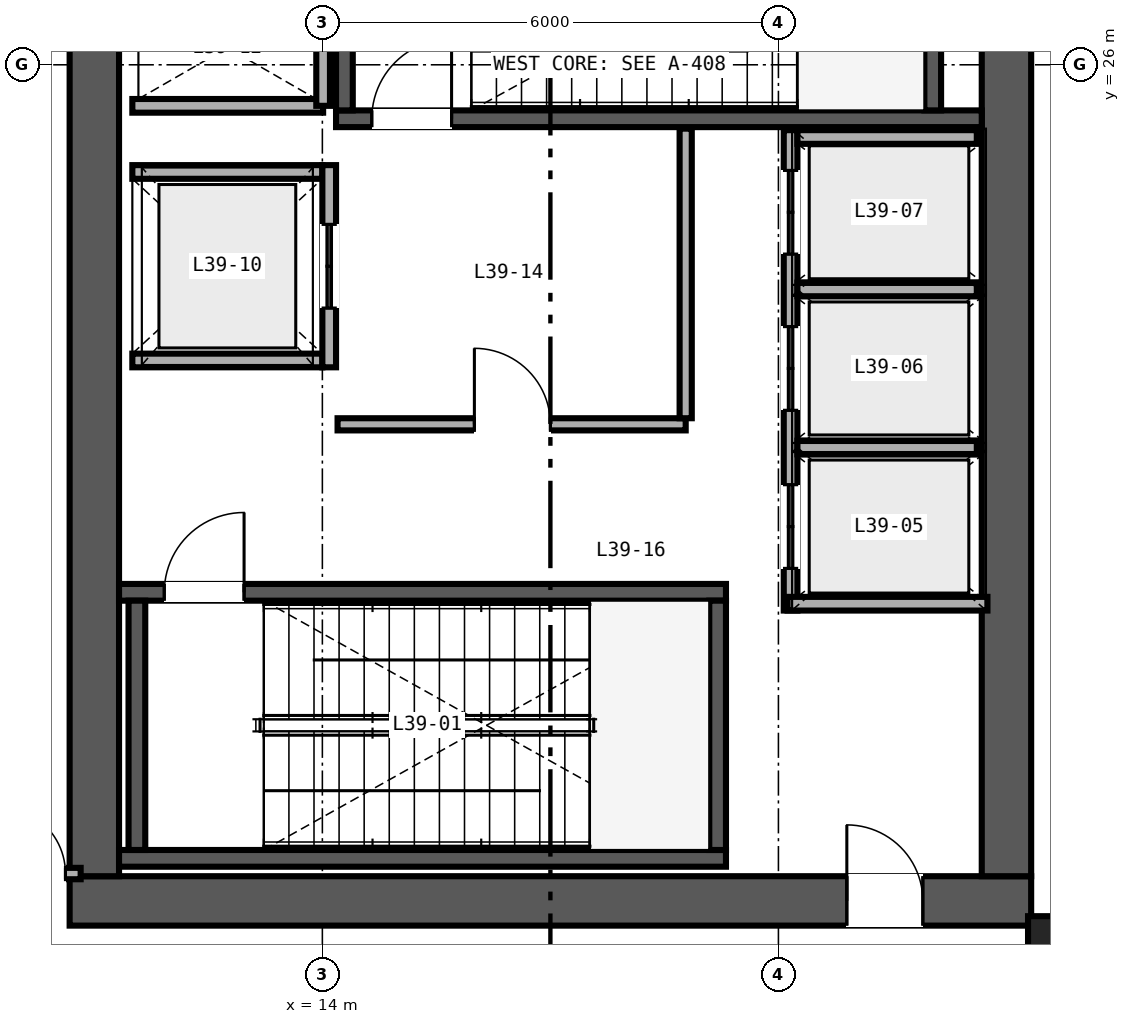
"""IFC4 building model, lengths in metres.
Left out: names, types, materials, properties, quantities, classifications, styles, units other than length and angle.
Written with IfcOpenShell. Run it as: python <this file> out.ifc"""

import sys

from ifc_helpers import new_model, si_unit, direction, frame, frame_2d, origin, origin_2d, place, context, subcontext, project, spatial, rectangle, i_section, extrude, source, transform, mapped, element, fill, save


model = new_model("IFC4")
c1 = context("Model", 3, precision=1e-05, world=origin(), true_north=direction((0.0, 1.0)))
c2 = subcontext(c1, "Body", "Model", "MODEL_VIEW")
j1 = project(units=[si_unit("LENGTHUNIT", "METRE"), si_unit("PLANEANGLEUNIT", "RADIAN")], contexts=[c1])
p1 = place(None, origin())
s1 = spatial("IfcSite", under=j1, at=p1, CompositionType="ELEMENT")
p2 = place(p1, origin())
s2 = spatial("IfcBuilding", under=s1, at=p2, CompositionType="ELEMENT")
p3 = place(p2, frame((0.0, 0.0, 158.4)))
s3 = spatial("IfcBuildingStorey", under=s2, at=p3, CompositionType="ELEMENT", Elevation=158.4)
p4 = place(p3, frame((10.675, 15.0, 0.0), z_axis=(0.0, 0.0, 1.0), x_axis=(1.0, 0.0, 0.0)))
e1 = element("IfcWall", 1, at=p4, inside=s3, PredefinedType="SHEAR", context=c2, shape_type="SweptSolid", body=[
    extrude(rectangle(XDim=12.65, YDim=0.65, at=frame_2d((6.325, 0.0))), origin(), (0.0, 0.0, 1.0), 4.57),
])
p5 = place(p4, frame((10.225, 0.0, 0.0)))
e2 = element("IfcOpeningElement", 2, at=p5, cuts=e1, PredefinedType="OPENING", context=c2, shape_type="SweptSolid", body=[
    extrude(rectangle(XDim=1.0, YDim=2.15, at=frame_2d((0.5, 1.075))), frame((0.0, 0.335, 0.0), z_axis=(0.0, -1.0, 0.0), x_axis=(1.0, 0.0, 0.0)), (0.0, 0.0, 1.0), 0.67),
])
for number, where, z_axis, x_axis in (
    (3, (11.0, 15.325, 0.0), (0.0, 0.0, 1.0), (0.0, 1.0, 0.0)),
    (4, (23.0, 15.325, 0.0), (0.0, 0.0, 1.0), (0.0, 1.0, 0.0)),
):
    element("IfcWall", number, at=place(p3, frame(where, z_axis=z_axis, x_axis=x_axis)), inside=s3, PredefinedType="SHEAR", context=c2, shape_type="SweptSolid", body=[
        extrude(rectangle(XDim=21.35, YDim=0.65, at=frame_2d((10.675, 0.0))), origin(), (0.0, 0.0, 1.0), 4.57),
    ])
p6 = place(p3, frame((11.325, 15.56, 0.0), z_axis=(0.0, 0.0, 1.0), x_axis=(1.0, 0.0, 0.0)))
e5 = element("IfcWall", 5, at=p6, inside=s3, PredefinedType="SHEAR", context=c2, shape_type="SweptSolid", body=[
    extrude(rectangle(XDim=7.985, YDim=0.22, at=frame_2d((3.993, 0.0))), origin(), (0.0, 0.0, 1.0), 4.6),
])
p7 = place(p3, frame((11.325, 19.06, 0.0), z_axis=(0.0, 0.0, 1.0), x_axis=(1.0, 0.0, 0.0)))
e6 = element("IfcWall", 6, at=p7, inside=s3, PredefinedType="SHEAR", context=c2, shape_type="SweptSolid", body=[
    extrude(rectangle(XDim=7.985, YDim=0.22, at=frame_2d((3.993, 0.0))), origin(), (0.0, 0.0, 1.0), 4.6),
])
p8 = place(p7, frame((0.595, 0.0, 0.0)))
e7 = element("IfcOpeningElement", 7, at=p8, cuts=e6, PredefinedType="OPENING", context=c2, shape_type="SweptSolid", body=[
    extrude(rectangle(XDim=1.05, YDim=2.15, at=frame_2d((0.525, 1.075))), frame((0.0, 0.12, 0.0), z_axis=(0.0, -1.0, 0.0), x_axis=(1.0, 0.0, 0.0)), (0.0, 0.0, 1.0), 0.24),
])
for number, where, z_axis, x_axis in (
    (8, (11.56, 15.67, 0.0), (0.0, 0.0, 1.0), (0.0, 1.0, 0.0)),
    (9, (19.2, 15.67, 0.0), (0.0, 0.0, 1.0), (0.0, 1.0, 0.0)),
):
    element("IfcWall", number, at=place(p3, frame(where, z_axis=z_axis, x_axis=x_axis)), inside=s3, PredefinedType="SHEAR", context=c2, shape_type="SweptSolid", body=[
        extrude(rectangle(XDim=3.28, YDim=0.22, at=frame_2d((1.64, 0.0))), origin(), (0.0, 0.0, 1.0), 4.6),
    ])
p9 = place(p3, frame((14.18, 25.29, 0.0), z_axis=(0.0, 0.0, 1.0), x_axis=(1.0, 0.0, 0.0)))
e10 = element("IfcWall", 10, at=p9, inside=s3, PredefinedType="SHEAR", context=c2, shape_type="SweptSolid", body=[
    extrude(rectangle(XDim=8.495, YDim=0.22, at=frame_2d((4.248, 0.0))), origin(), (0.0, 0.0, 1.0), 4.6),
])
p10 = place(p9, frame((0.47, 0.0, 0.0)))
e11 = element("IfcOpeningElement", 11, at=p10, cuts=e10, PredefinedType="OPENING", context=c2, shape_type="SweptSolid", body=[
    extrude(rectangle(XDim=1.05, YDim=2.15, at=frame_2d((0.525, 1.075))), frame((0.0, 0.12, 0.0), z_axis=(0.0, -1.0, 0.0), x_axis=(1.0, 0.0, 0.0)), (0.0, 0.0, 1.0), 0.24),
])
for number, where, z_axis, x_axis in (
    (12, (14.29, 25.4, 0.0), (0.0, 0.0, 1.0), (0.0, 1.0, 0.0)),
    (13, (22.03, 25.4, 0.0), (0.0, 0.0, 1.0), (0.0, 1.0, 0.0)),
):
    element("IfcWall", number, at=place(p3, frame(where, z_axis=z_axis, x_axis=x_axis)), inside=s3, PredefinedType="SHEAR", context=c2, shape_type="SweptSolid", body=[
        extrude(rectangle(XDim=3.28, YDim=0.22, at=frame_2d((1.64, 0.0))), origin(), (0.0, 0.0, 1.0), 4.6),
    ])
m1 = source(origin(), c2, "Body", "SweptSolid", [
    extrude(i_section(OverallWidth=0.432, OverallDepth=0.498, WebThickness=0.056, FlangeThickness=0.089, FilletRadius=0.025, at=origin_2d()), origin(), (0.0, 0.0, 1.0), 4.57),
])
p11 = place(p3, frame((23.5, 14.55, 0.0), z_axis=(0.0, 0.0, 1.0), x_axis=(1.0, 0.0, 0.0)))
e14 = element("IfcColumn", 14, at=p11, inside=s3, PredefinedType="COLUMN", context=c2, shape_type="MappedRepresentation", body=[
    mapped(m1, transform((0.0, 0.0, 0.0), scale=1.0)),
])
p12 = place(p3, frame((20.16, 18.82, 0.0), z_axis=(0.0, 0.0, 1.0), x_axis=(0.0, 1.0, 0.0)))
e15 = element("IfcWall", 15, at=p12, inside=s3, PredefinedType="SOLIDWALL", context=c2, shape_type="SweptSolid", body=[
    extrude(rectangle(XDim=6.32, YDim=0.18, at=frame_2d((3.16, 0.0))), origin(), (0.0, 0.0, 1.0), 3.47),
])
p13 = place(p12, frame((0.555, 0.0, 0.0)))
e16 = element("IfcOpeningElement", 16, at=p13, cuts=e15, PredefinedType="OPENING", context=c2, shape_type="SweptSolid", body=[
    extrude(rectangle(XDim=1.1, YDim=2.2, at=frame_2d((0.55, 1.1))), frame((0.0, 0.1, 0.0), z_axis=(0.0, -1.0, 0.0), x_axis=(1.0, 0.0, 0.0)), (0.0, 0.0, 1.0), 0.2),
])
p14 = place(p12, frame((2.635, 0.0, 0.0)))
e17 = element("IfcOpeningElement", 17, at=p14, cuts=e15, PredefinedType="OPENING", context=c2, shape_type="SweptSolid", body=[
    extrude(rectangle(XDim=1.1, YDim=2.2, at=frame_2d((0.55, 1.1))), frame((0.0, 0.1, 0.0), z_axis=(0.0, -1.0, 0.0), x_axis=(1.0, 0.0, 0.0)), (0.0, 0.0, 1.0), 0.2),
])
p15 = place(p12, frame((4.69, 0.0, 0.0)))
e18 = element("IfcOpeningElement", 18, at=p15, cuts=e15, PredefinedType="OPENING", context=c2, shape_type="SweptSolid", body=[
    extrude(rectangle(XDim=1.1, YDim=2.2, at=frame_2d((0.55, 1.1))), frame((0.0, 0.1, 0.0), z_axis=(0.0, -1.0, 0.0), x_axis=(1.0, 0.0, 0.0)), (0.0, 0.0, 1.0), 0.2),
])
p16 = place(p3, frame((20.12, 18.91, 0.0), z_axis=(0.0, 0.0, 1.0), x_axis=(1.0, 0.0, 0.0)))
e19 = element("IfcWall", 19, at=p16, inside=s3, PredefinedType="SOLIDWALL", context=c2, shape_type="SweptSolid", body=[
    extrude(rectangle(XDim=2.63, YDim=0.18, at=frame_2d((1.315, 0.0))), origin(), (0.0, 0.0, 1.0), 4.57),
])
p17 = place(p3, frame((20.25, 25.05, 0.0), z_axis=(0.0, 0.0, 1.0), x_axis=(1.0, 0.0, 0.0)))
e20 = element("IfcWall", 20, at=p17, inside=s3, PredefinedType="SOLIDWALL", context=c2, shape_type="SweptSolid", body=[
    extrude(rectangle(XDim=2.36, YDim=0.18, at=frame_2d((1.18, 0.0))), origin(), (0.0, 0.0, 1.0), 4.57),
])
p18 = place(p3, frame((20.25, 20.965, 0.0), z_axis=(0.0, 0.0, 1.0), x_axis=(1.0, 0.0, 0.0)))
e21 = element("IfcWall", 21, at=p18, inside=s3, PredefinedType="SOLIDWALL", context=c2, shape_type="SweptSolid", body=[
    extrude(rectangle(XDim=2.36, YDim=0.18, at=frame_2d((1.18, 0.0))), origin(), (0.0, 0.0, 1.0), 3.47),
])
p19 = place(p3, frame((20.25, 23.045, 0.0), z_axis=(0.0, 0.0, 1.0), x_axis=(1.0, 0.0, 0.0)))
e22 = element("IfcWall", 22, at=p19, inside=s3, PredefinedType="SOLIDWALL", context=c2, shape_type="SweptSolid", body=[
    extrude(rectangle(XDim=2.36, YDim=0.18, at=frame_2d((1.18, 0.0))), origin(), (0.0, 0.0, 1.0), 4.57),
])
for number, where, z_axis, x_axis in (
    (23, (11.5, 22.11, 0.0), (0.0, 0.0, 1.0), (1.0, 0.0, 0.0)),
    (24, (11.5, 24.59, 0.0), (0.0, 0.0, 1.0), (1.0, 0.0, 0.0)),
):
    element("IfcWall", number, at=place(p3, frame(where, z_axis=z_axis, x_axis=x_axis)), inside=s3, PredefinedType="SOLIDWALL", context=c2, shape_type="SweptSolid", body=[
        extrude(rectangle(XDim=2.5, YDim=0.18, at=frame_2d((1.25, 0.0))), origin(), (0.0, 0.0, 1.0), 4.57),
    ])
p20 = place(p3, frame((14.09, 22.02, 0.0), z_axis=(0.0, 0.0, 1.0), x_axis=(0.0, 1.0, 0.0)))
e25 = element("IfcWall", 25, at=p20, inside=s3, PredefinedType="SOLIDWALL", context=c2, shape_type="SweptSolid", body=[
    extrude(rectangle(XDim=2.66, YDim=0.18, at=frame_2d((1.33, 0.0))), origin(), (0.0, 0.0, 1.0), 4.57),
])
p21 = place(p20, frame((0.78, 0.0, 0.0)))
e26 = element("IfcOpeningElement", 26, at=p21, cuts=e25, PredefinedType="OPENING", context=c2, shape_type="SweptSolid", body=[
    extrude(rectangle(XDim=1.1, YDim=2.2, at=frame_2d((0.55, 1.1))), frame((0.0, 0.1, 0.0), z_axis=(0.0, -1.0, 0.0), x_axis=(1.0, 0.0, 0.0)), (0.0, 0.0, 1.0), 0.2),
])
p22 = place(p3, frame((11.5, 25.46, 0.0), z_axis=(0.0, 0.0, 1.0), x_axis=(1.0, 0.0, 0.0)))
e27 = element("IfcWall", 27, at=p22, inside=s3, PredefinedType="SOLIDWALL", context=c2, shape_type="SweptSolid", body=[
    extrude(rectangle(XDim=2.51, YDim=0.18, at=frame_2d((1.255, 0.0))), origin(), (0.0, 0.0, 1.0), 4.57),
])
p23 = place(p3, frame((14.01, 25.46, 0.0), z_axis=(0.0, 0.0, 1.0), x_axis=(0.0, 1.0, 0.0)))
e28 = element("IfcWall", 28, at=p23, inside=s3, PredefinedType="SOLIDWALL", context=c2, shape_type="SweptSolid", body=[
    extrude(rectangle(XDim=3.08, YDim=0.18, at=frame_2d((1.54, 0.0))), origin(), (0.0, 0.0, 1.0), 4.57),
])
p24 = place(p3, frame((14.2, 21.27, 0.0), z_axis=(0.0, 0.0, 1.0), x_axis=(1.0, 0.0, 0.0)))
e29 = element("IfcWall", 29, at=p24, inside=s3, PredefinedType="PARTITIONING", context=c2, shape_type="SweptSolid", body=[
    extrude(rectangle(XDim=4.58, YDim=0.16, at=frame_2d((2.29, 0.0))), origin(), (0.0, 0.0, 1.0), 4.57),
])
p25 = place(p24, frame((1.8, 0.0, 0.0)))
e30 = element("IfcOpeningElement", 30, at=p25, cuts=e29, PredefinedType="OPENING", context=c2, shape_type="SweptSolid", body=[
    extrude(rectangle(XDim=1.0, YDim=2.15, at=frame_2d((0.5, 1.075))), frame((0.0, 0.09, 0.0), z_axis=(0.0, -1.0, 0.0), x_axis=(1.0, 0.0, 0.0)), (0.0, 0.0, 1.0), 0.18),
])
p26 = place(p3, frame((18.78, 21.35, 0.0), z_axis=(0.0, 0.0, 1.0), x_axis=(0.0, 1.0, 0.0)))
e31 = element("IfcWall", 31, at=p26, inside=s3, PredefinedType="PARTITIONING", context=c2, shape_type="SweptSolid", body=[
    extrude(rectangle(XDim=3.81, YDim=0.16, at=frame_2d((1.905, 0.0))), origin(), (0.0, 0.0, 1.0), 4.57),
])
p27 = place(p3, frame((8.16, 15.36, 0.0), z_axis=(0.0, 0.0, 1.0), x_axis=(1.0, 0.0, 0.0)))
e32 = element("IfcWall", 32, at=p27, inside=s3, PredefinedType="PARTITIONING", context=c2, shape_type="SweptSolid", body=[
    extrude(rectangle(XDim=2.66, YDim=0.15, at=frame_2d((1.33, 0.0))), origin(), (0.0, 0.0, 1.0), 3.791),
])
p28 = place(p27, frame((1.58, 0.0, 0.0)))
e33 = element("IfcOpeningElement", 33, at=p28, cuts=e32, PredefinedType="OPENING", context=c2, shape_type="SweptSolid", body=[
    extrude(rectangle(XDim=0.88, YDim=2.15, at=frame_2d((0.44, 1.075))), frame((0.0, 0.085, 0.0), z_axis=(0.0, -1.0, 0.0), x_axis=(1.0, 0.0, 0.0)), (0.0, 0.0, 1.0), 0.17),
])
m2 = source(origin(), c2, "Body", "SweptSolid", [
    extrude(rectangle(XDim=1.05, YDim=2.15, at=frame_2d((0.525, 1.075))), frame((0.0, 0.025, 0.0), z_axis=(0.0, -1.0, 0.0), x_axis=(1.0, 0.0, 0.0)), (0.0, 0.0, 1.0), 0.05),
])
p29 = place(p8, origin())
e34 = element("IfcDoor", 34, at=p29, inside=s3, OperationType="SINGLE_SWING_RIGHT", PredefinedType="DOOR", context=c2, shape_type="MappedRepresentation", body=[
    mapped(m2, transform((0.0, 0.0, 0.0), scale=1.0)),
])
fill(e7, e34)
p30 = place(p10, origin())
e35 = element("IfcDoor", 35, at=p30, inside=s3, OperationType="SINGLE_SWING_RIGHT", PredefinedType="DOOR", context=c2, shape_type="MappedRepresentation", body=[
    mapped(m2, transform((0.0, 0.0, 0.0), scale=1.0)),
])
fill(e11, e35)
m3 = source(origin(), c2, "Body", "SweptSolid", [
    extrude(rectangle(XDim=1.1, YDim=2.2, at=frame_2d((0.55, 1.1))), frame((0.0, 0.025, 0.0), z_axis=(0.0, -1.0, 0.0), x_axis=(1.0, 0.0, 0.0)), (0.0, 0.0, 1.0), 0.05),
])
p31 = place(p13, origin())
e36 = element("IfcDoor", 36, at=p31, inside=s3, OperationType="DOUBLE_DOOR_SLIDING", PredefinedType="DOOR", context=c2, shape_type="MappedRepresentation", body=[
    mapped(m3, transform((0.0, 0.0, 0.0), scale=1.0)),
])
fill(e16, e36)
p32 = place(p14, origin())
e37 = element("IfcDoor", 37, at=p32, inside=s3, OperationType="DOUBLE_DOOR_SLIDING", PredefinedType="DOOR", context=c2, shape_type="MappedRepresentation", body=[
    mapped(m3, transform((0.0, 0.0, 0.0), scale=1.0)),
])
fill(e17, e37)
p33 = place(p15, origin())
e38 = element("IfcDoor", 38, at=p33, inside=s3, OperationType="DOUBLE_DOOR_SLIDING", PredefinedType="DOOR", context=c2, shape_type="MappedRepresentation", body=[
    mapped(m3, transform((0.0, 0.0, 0.0), scale=1.0)),
])
fill(e18, e38)
p34 = place(p21, origin())
e39 = element("IfcDoor", 39, at=p34, inside=s3, OperationType="DOUBLE_DOOR_SLIDING", PredefinedType="DOOR", context=c2, shape_type="MappedRepresentation", body=[
    mapped(m3, transform((0.0, 0.0, 0.0), scale=1.0)),
])
fill(e26, e39)
m4 = source(origin(), c2, "Body", "SweptSolid", [
    extrude(rectangle(XDim=1.0, YDim=2.15, at=frame_2d((0.5, 1.075))), frame((0.0, 0.025, 0.0), z_axis=(0.0, -1.0, 0.0), x_axis=(1.0, 0.0, 0.0)), (0.0, 0.0, 1.0), 0.05),
])
p35 = place(p25, origin())
e40 = element("IfcDoor", 40, at=p35, inside=s3, OperationType="SINGLE_SWING_LEFT", PredefinedType="DOOR", context=c2, shape_type="MappedRepresentation", body=[
    mapped(m4, transform((0.0, 0.0, 0.0), scale=1.0)),
])
fill(e30, e40)
p36 = place(p5, origin())
e41 = element("IfcDoor", 41, at=p36, inside=s3, OperationType="SINGLE_SWING_LEFT", PredefinedType="DOOR", context=c2, shape_type="MappedRepresentation", body=[
    mapped(m4, transform((0.0, 0.0, 0.0), scale=1.0)),
])
fill(e2, e41)
m5 = source(origin(), c2, "Body", "SweptSolid", [
    extrude(rectangle(XDim=0.88, YDim=2.15, at=frame_2d((0.44, 1.075))), frame((0.0, 0.025, 0.0), z_axis=(0.0, -1.0, 0.0), x_axis=(1.0, 0.0, 0.0)), (0.0, 0.0, 1.0), 0.05),
])
p37 = place(p28, origin())
e42 = element("IfcDoor", 42, at=p37, inside=s3, OperationType="SINGLE_SWING_LEFT", PredefinedType="DOOR", context=c2, shape_type="MappedRepresentation", body=[
    mapped(m5, transform((0.0, 0.0, 0.0), scale=1.0)),
])
fill(e33, e42)
save(model, sys.argv[1])
